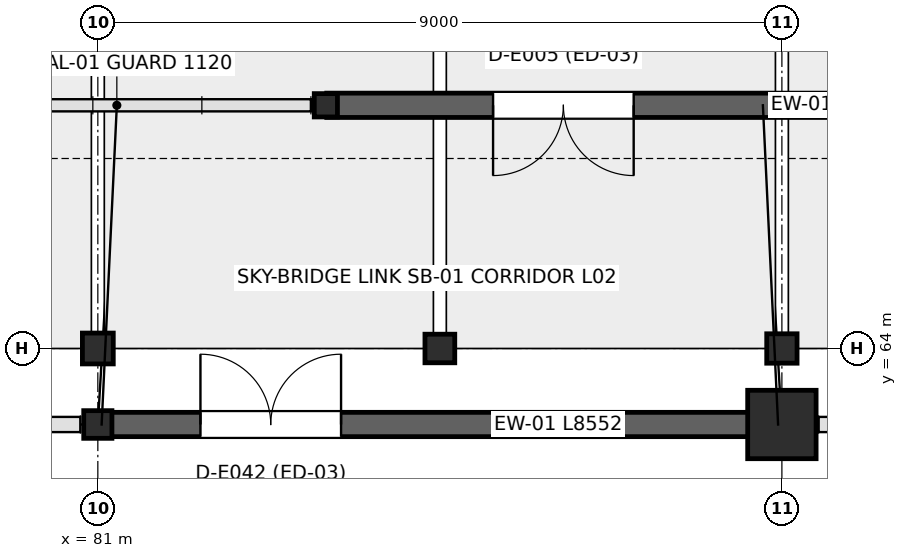
"""IFC4 building model, lengths in metres.
Left out: names, types, materials, properties, quantities, classifications, styles, units other than length and angle.
Written with IfcOpenShell. Run it as: python <this file> out.ifc"""

import sys

from ifc_helpers import new_model, si_unit, direction, frame, frame_2d, origin, origin_2d, place, context, subcontext, project, spatial, rectangle, hollow_rectangle, circle, i_section, extrude, element, fill, save


model = new_model("IFC4")
c1 = context("Model", 3, precision=1e-05, world=origin(), true_north=direction((0.0, 1.0)))
c2 = subcontext(c1, "Body", "Model", "MODEL_VIEW")
j1 = project(units=[si_unit("LENGTHUNIT", "METRE"), si_unit("PLANEANGLEUNIT", "RADIAN")], contexts=[c1])
p1 = place(None, origin())
s1 = spatial("IfcSite", under=j1, at=p1, CompositionType="ELEMENT")
p2 = place(p1, origin())
s2 = spatial("IfcBuilding", under=s1, at=p2, CompositionType="ELEMENT")
p3 = place(p2, frame((0.0, 0.0, 12.0)))
s3 = spatial("IfcBuildingStorey", under=s2, at=p3, CompositionType="ELEMENT", Elevation=12.0)
p4 = place(p3, frame((81.0, 64.0, 0.0), z_axis=(0.0, 0.0, 1.0), x_axis=(1.0, 0.0, 0.0)))
e1 = element("IfcColumn", 1, at=p4, inside=s3, PredefinedType="PILASTER", context=c2, shape_type="SweptSolid", body=[
    extrude(hollow_rectangle(XDim=0.406, YDim=0.406, WallThickness=0.015, at=origin_2d()), origin(), (0.0, 0.0, 1.0), 2.3),
])
p5 = place(p3, frame((85.5, 64.0, 0.0), z_axis=(0.0, 0.0, 1.0), x_axis=(1.0, 0.0, 0.0)))
e2 = element("IfcColumn", 2, at=p5, inside=s3, PredefinedType="COLUMN", context=c2, shape_type="SweptSolid", body=[
    extrude(i_section(OverallWidth=0.392, OverallDepth=0.376, WebThickness=0.017, FlangeThickness=0.028, at=origin_2d()), origin(), (0.0, 0.0, 1.0), 2.3),
])
p6 = place(p3, frame((90.0, 64.0, 0.0), z_axis=(0.0, 0.0, 1.0), x_axis=(1.0, 0.0, 0.0)))
e3 = element("IfcColumn", 3, at=p6, inside=s3, PredefinedType="COLUMN", context=c2, shape_type="SweptSolid", body=[
    extrude(i_section(OverallWidth=0.399, OverallDepth=0.387, WebThickness=0.021, FlangeThickness=0.033, at=origin_2d()), origin(), (0.0, 0.0, 1.0), 2.3),
])
p7 = place(p3, frame((84.0, 67.2, 0.0), z_axis=(0.0, 0.0, 1.0), x_axis=(1.0, 0.0, 0.0)))
e4 = element("IfcColumn", 4, at=p7, inside=s3, PredefinedType="COLUMN", context=c2, shape_type="SweptSolid", body=[
    extrude(i_section(OverallWidth=0.305, OverallDepth=0.307, WebThickness=0.01, FlangeThickness=0.015, at=origin_2d()), origin(), (0.0, 0.0, 1.0), 3.0),
])
p8 = place(p3, frame((81.0, 63.0, 0.0), z_axis=(0.0, 0.0, 1.0), x_axis=(1.0, 0.0, 0.0)))
e5 = element("IfcColumn", 5, at=p8, inside=s3, PredefinedType="COLUMN", context=c2, shape_type="SweptSolid", body=[
    extrude(i_section(OverallWidth=0.371, OverallDepth=0.364, WebThickness=0.013, FlangeThickness=0.022, at=origin_2d()), origin(), (0.0, 0.0, 1.0), 4.5),
])
p9 = place(p3, frame((90.0, 63.0, 0.0), z_axis=(0.0, 0.0, 1.0), x_axis=(1.0, 0.0, 0.0)))
e6 = element("IfcColumn", 6, at=p9, inside=s3, PredefinedType="COLUMN", context=c2, shape_type="SweptSolid", body=[
    extrude(circle(Radius=0.45, at=origin_2d()), origin(), (0.0, 0.0, 1.0), 4.5),
])
p10 = place(p3, frame((92.988, 67.2, 0.0), z_axis=(0.0, 0.0, 1.0), x_axis=(-1.0, 0.0, 0.0)))
e7 = element("IfcWall", 7, at=p10, inside=s3, PredefinedType="STANDARD", context=c2, shape_type="SweptSolid", body=[
    extrude(rectangle(XDim=8.976, YDim=0.32, at=frame_2d((4.488, 0.0))), origin(), (0.0, 0.0, 1.0), 3.0),
])
p11 = place(p10, frame((4.938, 0.0, 0.0)))
e8 = element("IfcOpeningElement", 8, at=p11, cuts=e7, PredefinedType="OPENING", context=c2, shape_type="SweptSolid", body=[
    extrude(rectangle(XDim=1.85, YDim=2.35, at=frame_2d((0.925, 1.175))), frame((0.0, 0.17, 0.0), z_axis=(0.0, -1.0, 0.0), x_axis=(1.0, 0.0, 0.0)), (0.0, 0.0, 1.0), 0.34),
])
p12 = place(p3, frame((81.013, 63.0, 0.0), z_axis=(0.0, 0.0, 1.0), x_axis=(1.0, 0.0, 0.0)))
e9 = element("IfcWall", 9, at=p12, inside=s3, PredefinedType="STANDARD", context=c2, shape_type="SweptSolid", body=[
    extrude(rectangle(XDim=8.552, YDim=0.32, at=frame_2d((4.276, 0.0))), origin(), (0.0, 0.0, 1.0), 4.325),
])
p13 = place(p12, frame((1.337, 0.0, 0.0)))
e10 = element("IfcOpeningElement", 10, at=p13, cuts=e9, PredefinedType="OPENING", context=c2, shape_type="SweptSolid", body=[
    extrude(rectangle(XDim=1.85, YDim=2.35, at=frame_2d((0.925, 1.175))), frame((0.0, 0.17, 0.0), z_axis=(0.0, -1.0, 0.0), x_axis=(1.0, 0.0, 0.0)), (0.0, 0.0, 1.0), 0.34),
])
p14 = place(p11, origin())
e11 = element("IfcDoor", 11, at=p14, inside=s3, OperationType="DOUBLE_DOOR_SINGLE_SWING", PredefinedType="DOOR", context=c2, shape_type="SweptSolid", body=[
    extrude(rectangle(XDim=1.85, YDim=2.35, at=frame_2d((0.925, 1.175))), frame((0.0, 0.025, 0.0), z_axis=(0.0, -1.0, 0.0), x_axis=(1.0, 0.0, 0.0)), (0.0, 0.0, 1.0), 0.05),
])
fill(e8, e11)
p15 = place(p13, origin())
e12 = element("IfcDoor", 12, at=p15, inside=s3, OperationType="DOUBLE_DOOR_SINGLE_SWING", PredefinedType="DOOR", context=c2, shape_type="SweptSolid", body=[
    extrude(rectangle(XDim=1.85, YDim=2.35, at=frame_2d((0.925, 1.175))), frame((0.0, 0.025, 0.0), z_axis=(0.0, -1.0, 0.0), x_axis=(1.0, 0.0, 0.0)), (0.0, 0.0, 1.0), 0.05),
])
fill(e10, e12)
save(model, sys.argv[1])
